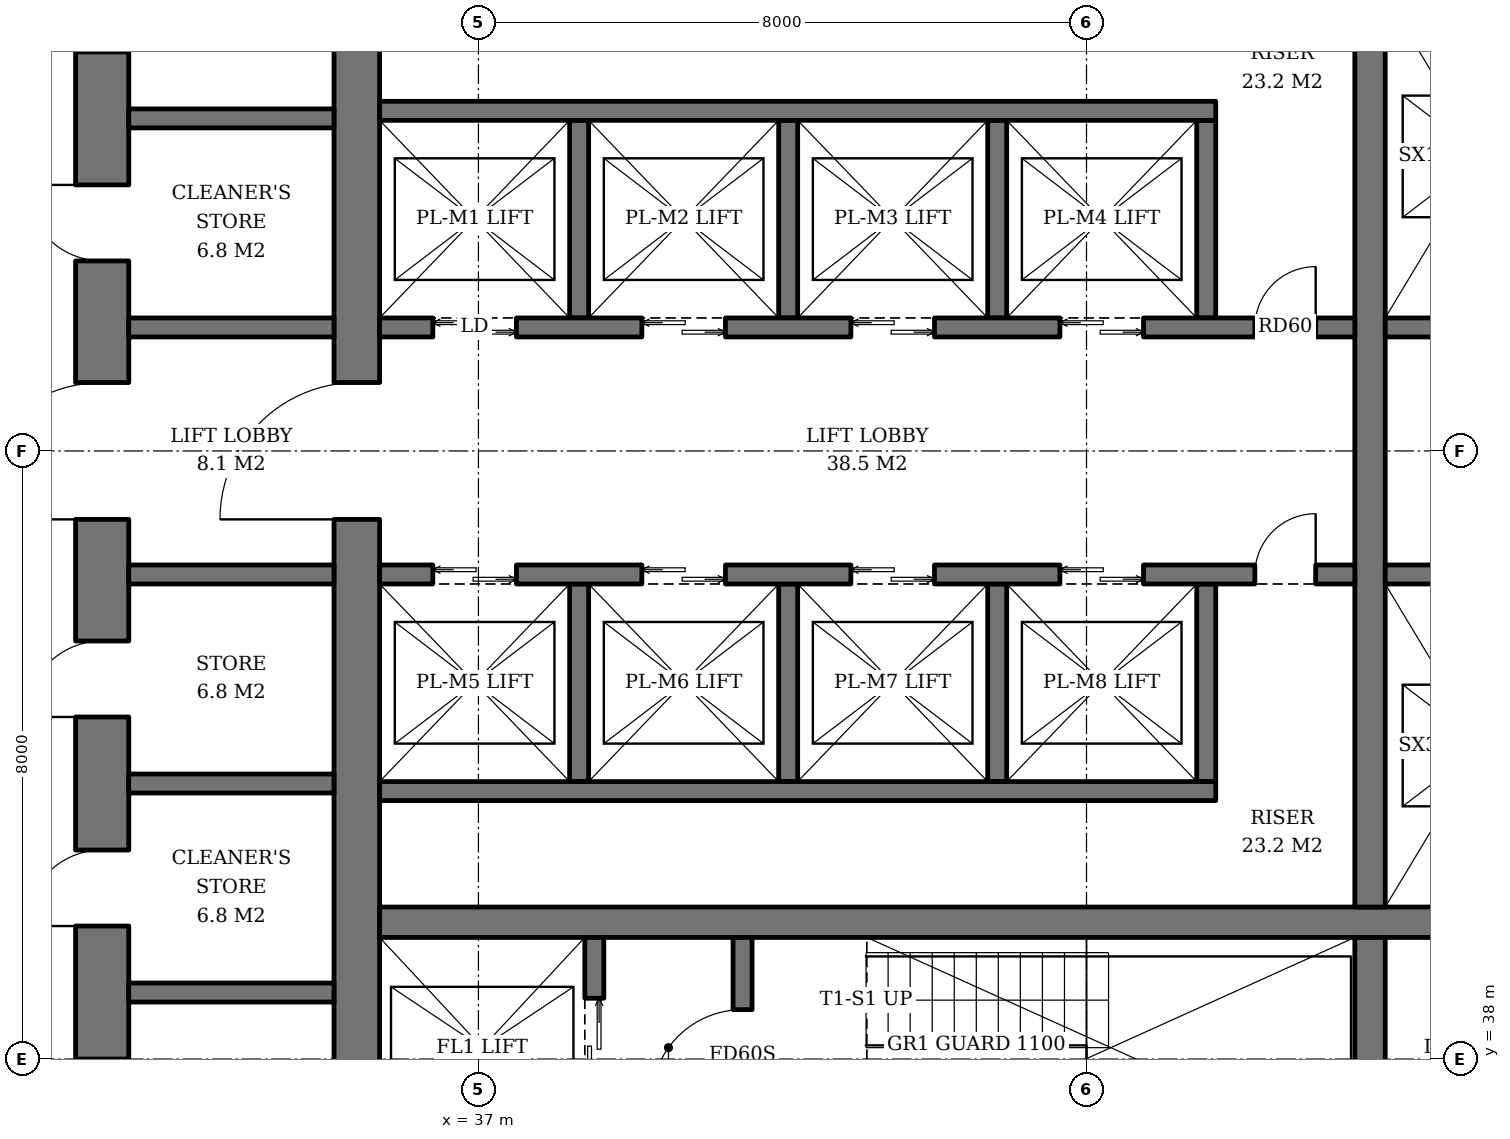
"""IFC4 building model, lengths in metres.
Left out: names, types, materials, properties, quantities, classifications, styles, units other than length and angle.
Written with IfcOpenShell. Run it as: python <this file> out.ifc"""

import sys

from ifc_helpers import new_model, si_unit, direction, frame, frame_2d, origin, place, context, subcontext, project, spatial, rectangle, extrude, element, fill, save


model = new_model("IFC4")
c1 = context("Model", 3, precision=1e-05, world=origin(), true_north=direction((0.0, 1.0)))
c2 = subcontext(c1, "Body", "Model", "MODEL_VIEW")
j1 = project(units=[si_unit("LENGTHUNIT", "METRE"), si_unit("PLANEANGLEUNIT", "RADIAN")], contexts=[c1])
p1 = place(None, origin())
s1 = spatial("IfcSite", under=j1, at=p1, CompositionType="ELEMENT")
p2 = place(p1, origin())
s2 = spatial("IfcBuilding", under=s1, at=p2, CompositionType="ELEMENT")
p3 = place(p2, frame((0.0, 0.0, 123.6)))
s3 = spatial("IfcBuildingStorey", under=s2, at=p3, CompositionType="ELEMENT", Elevation=123.6)
p4 = place(p3, frame((35.4, 36.7, 0.0), z_axis=(0.0, 0.0, 1.0), x_axis=(0.0, 1.0, 0.0)))
e1 = element("IfcWall", 1, at=p4, inside=s3, PredefinedType="SHEAR", context=c2, shape_type="SweptSolid", body=[
    extrude(rectangle(XDim=18.6, YDim=0.6, at=frame_2d((9.3, 0.0))), origin(), (0.0, 0.0, 1.0), 3.8),
])
p5 = place(p4, frame((8.4, 0.0, 0.0)))
e2 = element("IfcOpeningElement", 2, at=p5, cuts=e1, PredefinedType="OPENING", context=c2, shape_type="SweptSolid", body=[
    extrude(rectangle(XDim=1.8, YDim=2.4, at=frame_2d((0.9, 1.2))), frame((0.0, 0.31, 0.0), z_axis=(0.0, -1.0, 0.0), x_axis=(1.0, 0.0, 0.0)), (0.0, 0.0, 1.0), 0.62),
])
p6 = place(p3, frame((32.05, 33.4, 0.0), z_axis=(0.0, 0.0, 1.0), x_axis=(0.0, 1.0, 0.0)))
e3 = element("IfcWall", 3, at=p6, inside=s3, PredefinedType="SHEAR", context=c2, shape_type="SweptSolid", body=[
    extrude(rectangle(XDim=25.2, YDim=0.7, at=frame_2d((12.6, 0.0))), origin(), (0.0, 0.0, 1.0), 3.8),
])
p7 = place(p6, frame((11.7, 0.0, 0.0)))
e4 = element("IfcOpeningElement", 4, at=p7, cuts=e3, PredefinedType="OPENING", context=c2, shape_type="SweptSolid", body=[
    extrude(rectangle(XDim=1.8, YDim=2.4, at=frame_2d((0.9, 1.2))), frame((0.0, 0.36, 0.0), z_axis=(0.0, -1.0, 0.0), x_axis=(1.0, 0.0, 0.0)), (0.0, 0.0, 1.0), 0.72),
])
p8 = place(p6, frame((3.6, 0.0, 0.0)))
e5 = element("IfcOpeningElement", 5, at=p8, cuts=e3, PredefinedType="OPENING", context=c2, shape_type="SweptSolid", body=[
    extrude(rectangle(XDim=1.0, YDim=2.1, at=frame_2d((0.5, 1.05))), frame((0.0, 0.36, 0.0), z_axis=(0.0, -1.0, 0.0), x_axis=(1.0, 0.0, 0.0)), (0.0, 0.0, 1.0), 0.72),
])
p9 = place(p6, frame((6.35, 0.0, 0.0)))
e6 = element("IfcOpeningElement", 6, at=p9, cuts=e3, PredefinedType="OPENING", context=c2, shape_type="SweptSolid", body=[
    extrude(rectangle(XDim=1.0, YDim=2.1, at=frame_2d((0.5, 1.05))), frame((0.0, 0.36, 0.0), z_axis=(0.0, -1.0, 0.0), x_axis=(1.0, 0.0, 0.0)), (0.0, 0.0, 1.0), 0.72),
])
p10 = place(p6, frame((9.1, 0.0, 0.0)))
e7 = element("IfcOpeningElement", 7, at=p10, cuts=e3, PredefinedType="OPENING", context=c2, shape_type="SweptSolid", body=[
    extrude(rectangle(XDim=1.0, YDim=2.1, at=frame_2d((0.5, 1.05))), frame((0.0, 0.36, 0.0), z_axis=(0.0, -1.0, 0.0), x_axis=(1.0, 0.0, 0.0)), (0.0, 0.0, 1.0), 0.72),
])
p11 = place(p6, frame((15.1, 0.0, 0.0)))
e8 = element("IfcOpeningElement", 8, at=p11, cuts=e3, PredefinedType="OPENING", context=c2, shape_type="SweptSolid", body=[
    extrude(rectangle(XDim=1.0, YDim=2.1, at=frame_2d((0.5, 1.05))), frame((0.0, 0.36, 0.0), z_axis=(0.0, -1.0, 0.0), x_axis=(1.0, 0.0, 0.0)), (0.0, 0.0, 1.0), 0.72),
])
p12 = place(p6, frame((17.85, 0.0, 0.0)))
e9 = element("IfcOpeningElement", 9, at=p12, cuts=e3, PredefinedType="OPENING", context=c2, shape_type="SweptSolid", body=[
    extrude(rectangle(XDim=1.0, YDim=2.1, at=frame_2d((0.5, 1.05))), frame((0.0, 0.36, 0.0), z_axis=(0.0, -1.0, 0.0), x_axis=(1.0, 0.0, 0.0)), (0.0, 0.0, 1.0), 0.72),
])
p13 = place(p3, frame((35.7, 39.8, 0.0), z_axis=(0.0, 0.0, 1.0), x_axis=(1.0, 0.0, 0.0)))
e10 = element("IfcWall", 10, at=p13, inside=s3, PredefinedType="SHEAR", context=c2, shape_type="SweptSolid", body=[
    extrude(rectangle(XDim=18.6, YDim=0.4, at=frame_2d((9.3, 0.0))), origin(), (0.0, 0.0, 1.0), 3.8),
])
p14 = place(p3, frame((48.73, 36.7, 0.0), z_axis=(0.0, 0.0, 1.0), x_axis=(0.0, 1.0, 0.0)))
e11 = element("IfcWall", 11, at=p14, inside=s3, PredefinedType="SHEAR", context=c2, shape_type="SweptSolid", body=[
    extrude(rectangle(XDim=2.9, YDim=0.4, at=frame_2d((1.45, 0.0))), origin(), (0.0, 0.0, 1.0), 3.8),
])
p15 = place(p3, frame((48.73, 40.0, 0.0), z_axis=(0.0, 0.0, 1.0), x_axis=(0.0, 1.0, 0.0)))
e12 = element("IfcWall", 12, at=p15, inside=s3, PredefinedType="SHEAR", context=c2, shape_type="SweptSolid", body=[
    extrude(rectangle(XDim=12.0, YDim=0.4, at=frame_2d((6.0, 0.0))), origin(), (0.0, 0.0, 1.0), 3.8),
])
p16 = place(p3, frame((38.525, 36.7, 0.0), z_axis=(0.0, 0.0, 1.0), x_axis=(0.0, 1.0, 0.0)))
e13 = element("IfcWall", 13, at=p16, inside=s3, PredefinedType="SHEAR", context=c2, shape_type="SweptSolid", body=[
    extrude(rectangle(XDim=2.9, YDim=0.25, at=frame_2d((1.45, 0.0))), origin(), (0.0, 0.0, 1.0), 3.8),
])
p17 = place(p16, frame((0.8, 0.0, 0.0)))
e14 = element("IfcOpeningElement", 14, at=p17, cuts=e13, PredefinedType="OPENING", context=c2, shape_type="SweptSolid", body=[
    extrude(rectangle(XDim=1.3, YDim=2.2, at=frame_2d((0.65, 1.1))), frame((0.0, 0.135, 0.0), z_axis=(0.0, -1.0, 0.0), x_axis=(1.0, 0.0, 0.0)), (0.0, 0.0, 1.0), 0.27),
])
p18 = place(p3, frame((40.475, 36.7, 0.0), z_axis=(0.0, 0.0, 1.0), x_axis=(0.0, 1.0, 0.0)))
e15 = element("IfcWall", 15, at=p18, inside=s3, PredefinedType="SHEAR", context=c2, shape_type="SweptSolid", body=[
    extrude(rectangle(XDim=2.9, YDim=0.25, at=frame_2d((1.45, 0.0))), origin(), (0.0, 0.0, 1.0), 3.8),
])
p19 = place(p18, frame((0.75, 0.0, 0.0)))
e16 = element("IfcOpeningElement", 16, at=p19, cuts=e15, PredefinedType="OPENING", context=c2, shape_type="SweptSolid", body=[
    extrude(rectangle(XDim=1.2, YDim=2.1, at=frame_2d((0.6, 1.05))), frame((0.0, 0.135, 0.0), z_axis=(0.0, -1.0, 0.0), x_axis=(1.0, 0.0, 0.0)), (0.0, 0.0, 1.0), 0.27),
])
for number, where, z_axis, x_axis in (
    (17, (38.325, 47.75, 0.0), (0.0, 0.0, 1.0), (0.0, 1.0, 0.0)),
    (18, (41.075, 47.75, 0.0), (0.0, 0.0, 1.0), (0.0, 1.0, 0.0)),
    (19, (43.825, 47.75, 0.0), (0.0, 0.0, 1.0), (0.0, 1.0, 0.0)),
    (20, (46.575, 47.75, 0.0), (0.0, 0.0, 1.0), (0.0, 1.0, 0.0)),
):
    element("IfcWall", number, at=place(p3, frame(where, z_axis=z_axis, x_axis=x_axis)), inside=s3, PredefinedType="SHEAR", context=c2, shape_type="SweptSolid", body=[
        extrude(rectangle(XDim=2.6, YDim=0.25, at=frame_2d((1.3, 0.0))), origin(), (0.0, 0.0, 1.0), 3.8),
    ])
p20 = place(p3, frame((35.7, 50.475, 0.0), z_axis=(0.0, 0.0, 1.0), x_axis=(1.0, 0.0, 0.0)))
e21 = element("IfcWall", 21, at=p20, inside=s3, PredefinedType="SHEAR", context=c2, shape_type="SweptSolid", body=[
    extrude(rectangle(XDim=11.0, YDim=0.25, at=frame_2d((5.5, 0.0))), origin(), (0.0, 0.0, 1.0), 3.8),
])
p21 = place(p3, frame((35.7, 47.625, 0.0), z_axis=(0.0, 0.0, 1.0), x_axis=(1.0, 0.0, 0.0)))
e22 = element("IfcWall", 22, at=p21, inside=s3, PredefinedType="SHEAR", context=c2, shape_type="SweptSolid", body=[
    extrude(rectangle(XDim=12.83, YDim=0.25, at=frame_2d((6.415, 0.0))), origin(), (0.0, 0.0, 1.0), 3.8),
])
p22 = place(p21, frame((0.7, 0.0, 0.0)))
e23 = element("IfcOpeningElement", 23, at=p22, cuts=e22, PredefinedType="OPENING", context=c2, shape_type="SweptSolid", body=[
    extrude(rectangle(XDim=1.1, YDim=2.2, at=frame_2d((0.55, 1.1))), frame((0.0, 0.135, 0.0), z_axis=(0.0, -1.0, 0.0), x_axis=(1.0, 0.0, 0.0)), (0.0, 0.0, 1.0), 0.27),
])
p23 = place(p21, frame((3.45, 0.0, 0.0)))
e24 = element("IfcOpeningElement", 24, at=p23, cuts=e22, PredefinedType="OPENING", context=c2, shape_type="SweptSolid", body=[
    extrude(rectangle(XDim=1.1, YDim=2.2, at=frame_2d((0.55, 1.1))), frame((0.0, 0.135, 0.0), z_axis=(0.0, -1.0, 0.0), x_axis=(1.0, 0.0, 0.0)), (0.0, 0.0, 1.0), 0.27),
])
p24 = place(p21, frame((6.2, 0.0, 0.0)))
e25 = element("IfcOpeningElement", 25, at=p24, cuts=e22, PredefinedType="OPENING", context=c2, shape_type="SweptSolid", body=[
    extrude(rectangle(XDim=1.1, YDim=2.2, at=frame_2d((0.55, 1.1))), frame((0.0, 0.135, 0.0), z_axis=(0.0, -1.0, 0.0), x_axis=(1.0, 0.0, 0.0)), (0.0, 0.0, 1.0), 0.27),
])
p25 = place(p21, frame((8.95, 0.0, 0.0)))
e26 = element("IfcOpeningElement", 26, at=p25, cuts=e22, PredefinedType="OPENING", context=c2, shape_type="SweptSolid", body=[
    extrude(rectangle(XDim=1.1, YDim=2.2, at=frame_2d((0.55, 1.1))), frame((0.0, 0.135, 0.0), z_axis=(0.0, -1.0, 0.0), x_axis=(1.0, 0.0, 0.0)), (0.0, 0.0, 1.0), 0.27),
])
p26 = place(p21, frame((11.515, 0.0, 0.0)))
e27 = element("IfcOpeningElement", 27, at=p26, cuts=e22, PredefinedType="OPENING", context=c2, shape_type="SweptSolid", body=[
    extrude(rectangle(XDim=0.8, YDim=2.0, at=frame_2d((0.4, 1.0))), frame((0.0, 0.135, 0.0), z_axis=(0.0, -1.0, 0.0), x_axis=(1.0, 0.0, 0.0)), (0.0, 0.0, 1.0), 0.27),
])
for number, where, z_axis, x_axis in (
    (28, (38.325, 44.25, 0.0), (0.0, 0.0, 1.0), (0.0, -1.0, 0.0)),
    (29, (41.075, 44.25, 0.0), (0.0, 0.0, 1.0), (0.0, -1.0, 0.0)),
    (30, (43.825, 44.25, 0.0), (0.0, 0.0, 1.0), (0.0, -1.0, 0.0)),
    (31, (46.575, 44.25, 0.0), (0.0, 0.0, 1.0), (0.0, -1.0, 0.0)),
):
    element("IfcWall", number, at=place(p3, frame(where, z_axis=z_axis, x_axis=x_axis)), inside=s3, PredefinedType="SHEAR", context=c2, shape_type="SweptSolid", body=[
        extrude(rectangle(XDim=2.6, YDim=0.25, at=frame_2d((1.3, 0.0))), origin(), (0.0, 0.0, 1.0), 3.8),
    ])
p27 = place(p3, frame((35.7, 41.525, 0.0), z_axis=(0.0, 0.0, 1.0), x_axis=(1.0, 0.0, 0.0)))
e32 = element("IfcWall", 32, at=p27, inside=s3, PredefinedType="SHEAR", context=c2, shape_type="SweptSolid", body=[
    extrude(rectangle(XDim=11.0, YDim=0.25, at=frame_2d((5.5, 0.0))), origin(), (0.0, 0.0, 1.0), 3.8),
])
p28 = place(p3, frame((35.7, 44.375, 0.0), z_axis=(0.0, 0.0, 1.0), x_axis=(1.0, 0.0, 0.0)))
e33 = element("IfcWall", 33, at=p28, inside=s3, PredefinedType="SHEAR", context=c2, shape_type="SweptSolid", body=[
    extrude(rectangle(XDim=12.83, YDim=0.25, at=frame_2d((6.415, 0.0))), origin(), (0.0, 0.0, 1.0), 3.8),
])
p29 = place(p28, frame((0.7, 0.0, 0.0)))
e34 = element("IfcOpeningElement", 34, at=p29, cuts=e33, PredefinedType="OPENING", context=c2, shape_type="SweptSolid", body=[
    extrude(rectangle(XDim=1.1, YDim=2.2, at=frame_2d((0.55, 1.1))), frame((0.0, 0.135, 0.0), z_axis=(0.0, -1.0, 0.0), x_axis=(1.0, 0.0, 0.0)), (0.0, 0.0, 1.0), 0.27),
])
p30 = place(p28, frame((3.45, 0.0, 0.0)))
e35 = element("IfcOpeningElement", 35, at=p30, cuts=e33, PredefinedType="OPENING", context=c2, shape_type="SweptSolid", body=[
    extrude(rectangle(XDim=1.1, YDim=2.2, at=frame_2d((0.55, 1.1))), frame((0.0, 0.135, 0.0), z_axis=(0.0, -1.0, 0.0), x_axis=(1.0, 0.0, 0.0)), (0.0, 0.0, 1.0), 0.27),
])
p31 = place(p28, frame((6.2, 0.0, 0.0)))
e36 = element("IfcOpeningElement", 36, at=p31, cuts=e33, PredefinedType="OPENING", context=c2, shape_type="SweptSolid", body=[
    extrude(rectangle(XDim=1.1, YDim=2.2, at=frame_2d((0.55, 1.1))), frame((0.0, 0.135, 0.0), z_axis=(0.0, -1.0, 0.0), x_axis=(1.0, 0.0, 0.0)), (0.0, 0.0, 1.0), 0.27),
])
p32 = place(p28, frame((8.95, 0.0, 0.0)))
e37 = element("IfcOpeningElement", 37, at=p32, cuts=e33, PredefinedType="OPENING", context=c2, shape_type="SweptSolid", body=[
    extrude(rectangle(XDim=1.1, YDim=2.2, at=frame_2d((0.55, 1.1))), frame((0.0, 0.135, 0.0), z_axis=(0.0, -1.0, 0.0), x_axis=(1.0, 0.0, 0.0)), (0.0, 0.0, 1.0), 0.27),
])
p33 = place(p28, frame((11.515, 0.0, 0.0)))
e38 = element("IfcOpeningElement", 38, at=p33, cuts=e33, PredefinedType="OPENING", context=c2, shape_type="SweptSolid", body=[
    extrude(rectangle(XDim=0.8, YDim=2.0, at=frame_2d((0.4, 1.0))), frame((0.0, 0.135, 0.0), z_axis=(0.0, -1.0, 0.0), x_axis=(1.0, 0.0, 0.0)), (0.0, 0.0, 1.0), 0.27),
])
for number, where, z_axis, x_axis in (
    (39, (48.93, 47.625, 0.0), (0.0, 0.0, 1.0), (1.0, 0.0, 0.0)),
    (40, (48.93, 44.375, 0.0), (0.0, 0.0, 1.0), (1.0, 0.0, 0.0)),
):
    element("IfcWall", number, at=place(p3, frame(where, z_axis=z_axis, x_axis=x_axis)), inside=s3, PredefinedType="SHEAR", context=c2, shape_type="SweptSolid", body=[
        extrude(rectangle(XDim=5.37, YDim=0.25, at=frame_2d((2.685, 0.0))), origin(), (0.0, 0.0, 1.0), 3.8),
    ])
for number, where, z_axis, x_axis in (
    (41, (32.4, 38.875, 0.0), (0.0, 0.0, 1.0), (1.0, 0.0, 0.0)),
    (42, (32.4, 41.625, 0.0), (0.0, 0.0, 1.0), (1.0, 0.0, 0.0)),
    (43, (32.4, 44.375, 0.0), (0.0, 0.0, 1.0), (1.0, 0.0, 0.0)),
    (44, (32.4, 47.625, 0.0), (0.0, 0.0, 1.0), (1.0, 0.0, 0.0)),
    (45, (32.4, 50.375, 0.0), (0.0, 0.0, 1.0), (1.0, 0.0, 0.0)),
):
    element("IfcWall", number, at=place(p3, frame(where, z_axis=z_axis, x_axis=x_axis)), inside=s3, PredefinedType="SHEAR", context=c2, shape_type="SweptSolid", body=[
        extrude(rectangle(XDim=2.7, YDim=0.25, at=frame_2d((1.35, 0.0))), origin(), (0.0, 0.0, 1.0), 3.8),
    ])
p34 = place(p17, origin())
e46 = element("IfcDoor", 46, at=p34, inside=s3, OperationType="DOUBLE_DOOR_SLIDING", PredefinedType="DOOR", context=c2, shape_type="SweptSolid", body=[
    extrude(rectangle(XDim=1.3, YDim=2.2, at=frame_2d((0.65, 1.1))), frame((0.0, 0.025, 0.0), z_axis=(0.0, -1.0, 0.0), x_axis=(1.0, 0.0, 0.0)), (0.0, 0.0, 1.0), 0.05),
])
fill(e14, e46)
p35 = place(p19, origin())
e47 = element("IfcDoor", 47, at=p35, inside=s3, OperationType="SINGLE_SWING_LEFT", PredefinedType="DOOR", context=c2, shape_type="SweptSolid", body=[
    extrude(rectangle(XDim=1.2, YDim=2.1, at=frame_2d((0.6, 1.05))), frame((0.0, 0.025, 0.0), z_axis=(0.0, -1.0, 0.0), x_axis=(1.0, 0.0, 0.0)), (0.0, 0.0, 1.0), 0.05),
])
fill(e16, e47)
p36 = place(p22, origin())
e48 = element("IfcDoor", 48, at=p36, inside=s3, OperationType="DOUBLE_DOOR_SLIDING", PredefinedType="DOOR", context=c2, shape_type="SweptSolid", body=[
    extrude(rectangle(XDim=1.1, YDim=2.2, at=frame_2d((0.55, 1.1))), frame((0.0, 0.025, 0.0), z_axis=(0.0, -1.0, 0.0), x_axis=(1.0, 0.0, 0.0)), (0.0, 0.0, 1.0), 0.05),
])
fill(e23, e48)
p37 = place(p23, origin())
e49 = element("IfcDoor", 49, at=p37, inside=s3, OperationType="DOUBLE_DOOR_SLIDING", PredefinedType="DOOR", context=c2, shape_type="SweptSolid", body=[
    extrude(rectangle(XDim=1.1, YDim=2.2, at=frame_2d((0.55, 1.1))), frame((0.0, 0.025, 0.0), z_axis=(0.0, -1.0, 0.0), x_axis=(1.0, 0.0, 0.0)), (0.0, 0.0, 1.0), 0.05),
])
fill(e24, e49)
p38 = place(p24, origin())
e50 = element("IfcDoor", 50, at=p38, inside=s3, OperationType="DOUBLE_DOOR_SLIDING", PredefinedType="DOOR", context=c2, shape_type="SweptSolid", body=[
    extrude(rectangle(XDim=1.1, YDim=2.2, at=frame_2d((0.55, 1.1))), frame((0.0, 0.025, 0.0), z_axis=(0.0, -1.0, 0.0), x_axis=(1.0, 0.0, 0.0)), (0.0, 0.0, 1.0), 0.05),
])
fill(e25, e50)
p39 = place(p25, origin())
e51 = element("IfcDoor", 51, at=p39, inside=s3, OperationType="DOUBLE_DOOR_SLIDING", PredefinedType="DOOR", context=c2, shape_type="SweptSolid", body=[
    extrude(rectangle(XDim=1.1, YDim=2.2, at=frame_2d((0.55, 1.1))), frame((0.0, 0.025, 0.0), z_axis=(0.0, -1.0, 0.0), x_axis=(1.0, 0.0, 0.0)), (0.0, 0.0, 1.0), 0.05),
])
fill(e26, e51)
p40 = place(p26, origin())
e52 = element("IfcDoor", 52, at=p40, inside=s3, OperationType="SINGLE_SWING_RIGHT", PredefinedType="DOOR", context=c2, shape_type="SweptSolid", body=[
    extrude(rectangle(XDim=0.8, YDim=2.0, at=frame_2d((0.4, 1.0))), frame((0.0, 0.025, 0.0), z_axis=(0.0, -1.0, 0.0), x_axis=(1.0, 0.0, 0.0)), (0.0, 0.0, 1.0), 0.05),
])
fill(e27, e52)
p41 = place(p29, origin())
e53 = element("IfcDoor", 53, at=p41, inside=s3, OperationType="DOUBLE_DOOR_SLIDING", PredefinedType="DOOR", context=c2, shape_type="SweptSolid", body=[
    extrude(rectangle(XDim=1.1, YDim=2.2, at=frame_2d((0.55, 1.1))), frame((0.0, 0.025, 0.0), z_axis=(0.0, -1.0, 0.0), x_axis=(1.0, 0.0, 0.0)), (0.0, 0.0, 1.0), 0.05),
])
fill(e34, e53)
p42 = place(p30, origin())
e54 = element("IfcDoor", 54, at=p42, inside=s3, OperationType="DOUBLE_DOOR_SLIDING", PredefinedType="DOOR", context=c2, shape_type="SweptSolid", body=[
    extrude(rectangle(XDim=1.1, YDim=2.2, at=frame_2d((0.55, 1.1))), frame((0.0, 0.025, 0.0), z_axis=(0.0, -1.0, 0.0), x_axis=(1.0, 0.0, 0.0)), (0.0, 0.0, 1.0), 0.05),
])
fill(e35, e54)
p43 = place(p31, origin())
e55 = element("IfcDoor", 55, at=p43, inside=s3, OperationType="DOUBLE_DOOR_SLIDING", PredefinedType="DOOR", context=c2, shape_type="SweptSolid", body=[
    extrude(rectangle(XDim=1.1, YDim=2.2, at=frame_2d((0.55, 1.1))), frame((0.0, 0.025, 0.0), z_axis=(0.0, -1.0, 0.0), x_axis=(1.0, 0.0, 0.0)), (0.0, 0.0, 1.0), 0.05),
])
fill(e36, e55)
p44 = place(p32, origin())
e56 = element("IfcDoor", 56, at=p44, inside=s3, OperationType="DOUBLE_DOOR_SLIDING", PredefinedType="DOOR", context=c2, shape_type="SweptSolid", body=[
    extrude(rectangle(XDim=1.1, YDim=2.2, at=frame_2d((0.55, 1.1))), frame((0.0, 0.025, 0.0), z_axis=(0.0, -1.0, 0.0), x_axis=(1.0, 0.0, 0.0)), (0.0, 0.0, 1.0), 0.05),
])
fill(e37, e56)
p45 = place(p33, origin())
e57 = element("IfcDoor", 57, at=p45, inside=s3, OperationType="SINGLE_SWING_RIGHT", PredefinedType="DOOR", context=c2, shape_type="SweptSolid", body=[
    extrude(rectangle(XDim=0.8, YDim=2.0, at=frame_2d((0.4, 1.0))), frame((0.0, 0.025, 0.0), z_axis=(0.0, -1.0, 0.0), x_axis=(1.0, 0.0, 0.0)), (0.0, 0.0, 1.0), 0.05),
])
fill(e38, e57)
p46 = place(p5, origin())
e58 = element("IfcDoor", 58, at=p46, inside=s3, OperationType="DOUBLE_DOOR_SINGLE_SWING", PredefinedType="DOOR", context=c2, shape_type="SweptSolid", body=[
    extrude(rectangle(XDim=1.8, YDim=2.4, at=frame_2d((0.9, 1.2))), frame((0.0, 0.025, 0.0), z_axis=(0.0, -1.0, 0.0), x_axis=(1.0, 0.0, 0.0)), (0.0, 0.0, 1.0), 0.05),
])
fill(e2, e58)
p47 = place(p7, origin())
e59 = element("IfcDoor", 59, at=p47, inside=s3, OperationType="DOUBLE_DOOR_SINGLE_SWING", PredefinedType="DOOR", context=c2, shape_type="SweptSolid", body=[
    extrude(rectangle(XDim=1.8, YDim=2.4, at=frame_2d((0.9, 1.2))), frame((0.0, 0.025, 0.0), z_axis=(0.0, -1.0, 0.0), x_axis=(1.0, 0.0, 0.0)), (0.0, 0.0, 1.0), 0.05),
])
fill(e4, e59)
p48 = place(p9, origin())
e60 = element("IfcDoor", 60, at=p48, inside=s3, OperationType="SINGLE_SWING_LEFT", PredefinedType="DOOR", context=c2, shape_type="SweptSolid", body=[
    extrude(rectangle(XDim=1.0, YDim=2.1, at=frame_2d((0.5, 1.05))), frame((0.0, -0.29, 0.0), z_axis=(0.0, -1.0, 0.0), x_axis=(1.0, 0.0, 0.0)), (0.0, 0.0, 1.0), 0.05),
])
fill(e6, e60)
p49 = place(p10, origin())
e61 = element("IfcDoor", 61, at=p49, inside=s3, OperationType="SINGLE_SWING_LEFT", PredefinedType="DOOR", context=c2, shape_type="SweptSolid", body=[
    extrude(rectangle(XDim=1.0, YDim=2.1, at=frame_2d((0.5, 1.05))), frame((0.0, -0.29, 0.0), z_axis=(0.0, -1.0, 0.0), x_axis=(1.0, 0.0, 0.0)), (0.0, 0.0, 1.0), 0.05),
])
fill(e7, e61)
p50 = place(p11, origin())
e62 = element("IfcDoor", 62, at=p50, inside=s3, OperationType="SINGLE_SWING_RIGHT", PredefinedType="DOOR", context=c2, shape_type="SweptSolid", body=[
    extrude(rectangle(XDim=1.0, YDim=2.1, at=frame_2d((0.5, 1.05))), frame((0.0, -0.29, 0.0), z_axis=(0.0, -1.0, 0.0), x_axis=(1.0, 0.0, 0.0)), (0.0, 0.0, 1.0), 0.05),
])
fill(e8, e62)
save(model, sys.argv[1])
